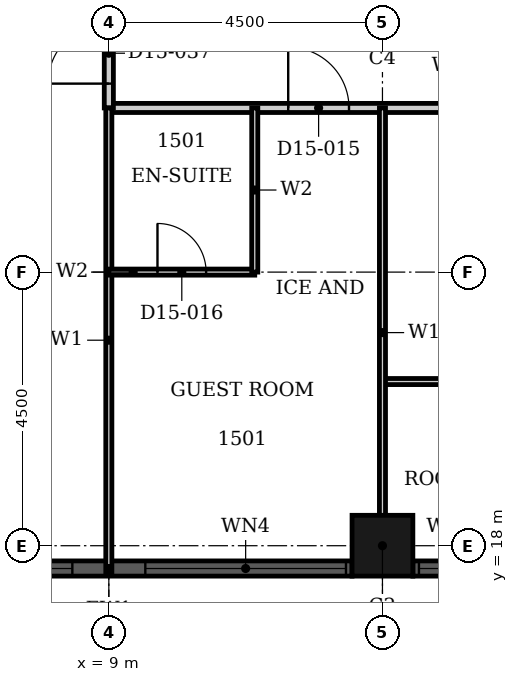
"""IFC4 building model, lengths in metres.
Left out: names, types, materials, properties, quantities, classifications, styles, units other than length and angle.
Written with IfcOpenShell. Run it as: python <this file> out.ifc"""

import sys

from ifc_helpers import new_model, si_unit, direction, frame, frame_2d, origin, origin_2d, place, context, subcontext, project, spatial, rectangle, hollow_rectangle, extrude, element, fill, save


model = new_model("IFC4")
c1 = context("Model", 3, precision=1e-05, world=origin(), true_north=direction((0.0, 1.0)))
c2 = subcontext(c1, "Body", "Model", "MODEL_VIEW")
j1 = project(units=[si_unit("LENGTHUNIT", "METRE"), si_unit("PLANEANGLEUNIT", "RADIAN")], contexts=[c1])
p1 = place(None, origin())
s1 = spatial("IfcSite", under=j1, at=p1, CompositionType="ELEMENT")
p2 = place(p1, origin())
s2 = spatial("IfcBuilding", under=s1, at=p2, CompositionType="ELEMENT")
p3 = place(p2, frame((0.0, 0.0, 67.2)))
s3 = spatial("IfcBuildingStorey", under=s2, at=p3, CompositionType="ELEMENT", Elevation=67.2)
p4 = place(p3, frame((13.5, 18.0, 0.0), z_axis=(0.0, 0.0, 1.0), x_axis=(1.0, 0.0, 0.0)))
e1 = element("IfcColumn", 1, at=p4, inside=s3, PredefinedType="COLUMN", context=c2, shape_type="SweptSolid", body=[
    extrude(hollow_rectangle(XDim=1.0, YDim=1.0, WallThickness=0.032, at=origin_2d()), origin(), (0.0, 0.0, 1.0), 3.6),
])
p5 = place(p3, frame((5.0, 17.625, 0.0), z_axis=(0.0, 0.0, 1.0), x_axis=(1.0, 0.0, 0.0)))
e2 = element("IfcWall", 2, at=p5, inside=s3, PredefinedType="SOLIDWALL", context=c2, shape_type="SweptSolid", body=[
    extrude(rectangle(XDim=8.0, YDim=0.25, at=frame_2d((4.0, 0.0))), origin(), (0.0, 0.0, 1.0), 3.6),
])
p6 = place(p5, frame((0.1, 0.0, 0.9)))
e3 = element("IfcOpeningElement", 3, at=p6, cuts=e2, PredefinedType="OPENING", context=c2, shape_type="SweptSolid", body=[
    extrude(rectangle(XDim=3.3, YDim=2.08, at=frame_2d((1.65, 1.04))), frame((0.0, 0.135, 0.0), z_axis=(0.0, -1.0, 0.0), x_axis=(1.0, 0.0, 0.0)), (0.0, 0.0, 1.0), 0.27),
])
p7 = place(p5, frame((4.6, 0.0, 0.9)))
e4 = element("IfcOpeningElement", 4, at=p7, cuts=e2, PredefinedType="OPENING", context=c2, shape_type="SweptSolid", body=[
    extrude(rectangle(XDim=3.3, YDim=2.08, at=frame_2d((1.65, 1.04))), frame((0.0, 0.135, 0.0), z_axis=(0.0, -1.0, 0.0), x_axis=(1.0, 0.0, 0.0)), (0.0, 0.0, 1.0), 0.27),
])
p8 = place(p3, frame((14.0, 17.625, 0.0), z_axis=(0.0, 0.0, 1.0), x_axis=(1.0, 0.0, 0.0)))
e5 = element("IfcWall", 5, at=p8, inside=s3, PredefinedType="SOLIDWALL", context=c2, shape_type="SweptSolid", body=[
    extrude(rectangle(XDim=1.25, YDim=0.25, at=frame_2d((0.625, 0.0))), origin(), (0.0, 0.0, 1.0), 3.6),
])
p9 = place(p8, frame((0.1, 0.0, 0.9)))
e6 = element("IfcOpeningElement", 6, at=p9, cuts=e5, PredefinedType="OPENING", context=c2, shape_type="SweptSolid", body=[
    extrude(rectangle(XDim=1.05, YDim=2.08, at=frame_2d((0.525, 1.04))), frame((0.0, 0.135, 0.0), z_axis=(0.0, -1.0, 0.0), x_axis=(1.0, 0.0, 0.0)), (0.0, 0.0, 1.0), 0.27),
])
p10 = place(p3, frame((9.0, 25.2, 0.0), z_axis=(0.0, 0.0, 1.0), x_axis=(1.0, 0.0, 0.0)))
e7 = element("IfcWall", 7, at=p10, inside=s3, PredefinedType="PARTITIONING", context=c2, shape_type="SweptSolid", body=[
    extrude(rectangle(XDim=7.2, YDim=0.15, at=frame_2d((3.6, 0.0))), origin(), (0.0, 0.0, 1.0), 3.3),
])
p11 = place(p10, frame((2.95, 0.0, 0.0)))
e8 = element("IfcOpeningElement", 8, at=p11, cuts=e7, PredefinedType="OPENING", context=c2, shape_type="SweptSolid", body=[
    extrude(rectangle(XDim=1.0, YDim=2.1, at=frame_2d((0.5, 1.05))), frame((0.0, 0.085, 0.0), z_axis=(0.0, -1.0, 0.0), x_axis=(1.0, 0.0, 0.0)), (0.0, 0.0, 1.0), 0.17),
])
p12 = place(p3, frame((9.0, 25.2, 0.0), z_axis=(0.0, 0.0, 1.0), x_axis=(0.0, 1.0, 0.0)))
e9 = element("IfcWall", 9, at=p12, inside=s3, PredefinedType="PARTITIONING", context=c2, shape_type="SweptSolid", body=[
    extrude(rectangle(XDim=1.8, YDim=0.15, at=frame_2d((0.9, 0.0))), origin(), (0.0, 0.0, 1.0), 3.3),
])
p13 = place(p12, frame((0.4, 0.0, 0.0)))
e10 = element("IfcOpeningElement", 10, at=p13, cuts=e9, PredefinedType="OPENING", context=c2, shape_type="SweptSolid", body=[
    extrude(rectangle(XDim=1.0, YDim=2.1, at=frame_2d((0.5, 1.05))), frame((0.0, 0.085, 0.0), z_axis=(0.0, -1.0, 0.0), x_axis=(1.0, 0.0, 0.0)), (0.0, 0.0, 1.0), 0.17),
])
p14 = place(p3, frame((13.5, 20.7, 0.0), z_axis=(0.0, 0.0, 1.0), x_axis=(1.0, 0.0, 0.0)))
e11 = element("IfcWall", 11, at=p14, inside=s3, PredefinedType="PARTITIONING", context=c2, shape_type="SweptSolid", body=[
    extrude(rectangle(XDim=2.7, YDim=0.1, at=frame_2d((1.35, 0.0))), origin(), (0.0, 0.0, 1.0), 3.3),
])
p15 = place(p3, frame((13.5, 17.81, 0.0), z_axis=(0.0, 0.0, 1.0), x_axis=(0.0, 1.0, 0.0)))
e12 = element("IfcWall", 12, at=p15, inside=s3, PredefinedType="PARTITIONING", context=c2, shape_type="SweptSolid", body=[
    extrude(rectangle(XDim=7.39, YDim=0.1, at=frame_2d((3.695, 0.0))), origin(), (0.0, 0.0, 1.0), 2.38),
])
p16 = place(p3, frame((9.0, 17.56, 0.0), z_axis=(0.0, 0.0, 1.0), x_axis=(0.0, 1.0, 0.0)))
e13 = element("IfcWall", 13, at=p16, inside=s3, PredefinedType="PARTITIONING", context=c2, shape_type="SweptSolid", body=[
    extrude(rectangle(XDim=7.64, YDim=0.1, at=frame_2d((3.82, 0.0))), origin(), (0.0, 0.0, 1.0), 3.3),
])
p17 = place(p3, frame((9.0, 22.5, 0.0), z_axis=(0.0, 0.0, 1.0), x_axis=(1.0, 0.0, 0.0)))
e14 = element("IfcWall", 14, at=p17, inside=s3, PredefinedType="PARTITIONING", context=c2, shape_type="SweptSolid", body=[
    extrude(rectangle(XDim=2.4, YDim=0.1, at=frame_2d((1.2, 0.0))), origin(), (0.0, 0.0, 1.0), 2.58),
])
p18 = place(p17, frame((0.8, 0.0, 0.0)))
e15 = element("IfcOpeningElement", 15, at=p18, cuts=e14, PredefinedType="OPENING", context=c2, shape_type="SweptSolid", body=[
    extrude(rectangle(XDim=0.8, YDim=2.1, at=frame_2d((0.4, 1.05))), frame((0.0, 0.06, 0.0), z_axis=(0.0, -1.0, 0.0), x_axis=(1.0, 0.0, 0.0)), (0.0, 0.0, 1.0), 0.12),
])
p19 = place(p3, frame((11.4, 22.5, 0.0), z_axis=(0.0, 0.0, 1.0), x_axis=(0.0, 1.0, 0.0)))
e16 = element("IfcWall", 16, at=p19, inside=s3, PredefinedType="PARTITIONING", context=c2, shape_type="SweptSolid", body=[
    extrude(rectangle(XDim=2.7, YDim=0.1, at=frame_2d((1.35, 0.0))), origin(), (0.0, 0.0, 1.0), 3.3),
])
p20 = place(p6, origin())
e17 = element("IfcWindow", 17, at=p20, inside=s3, PartitioningType="SINGLE_PANEL", PredefinedType="WINDOW", context=c2, shape_type="SweptSolid", body=[
    extrude(rectangle(XDim=3.3, YDim=2.08, at=frame_2d((1.65, 1.04))), frame((0.0, 0.03, 0.0), z_axis=(0.0, -1.0, 0.0), x_axis=(1.0, 0.0, 0.0)), (0.0, 0.0, 1.0), 0.06),
])
fill(e3, e17)
p21 = place(p7, origin())
e18 = element("IfcWindow", 18, at=p21, inside=s3, PartitioningType="SINGLE_PANEL", PredefinedType="WINDOW", context=c2, shape_type="SweptSolid", body=[
    extrude(rectangle(XDim=3.3, YDim=2.08, at=frame_2d((1.65, 1.04))), frame((0.0, 0.03, 0.0), z_axis=(0.0, -1.0, 0.0), x_axis=(1.0, 0.0, 0.0)), (0.0, 0.0, 1.0), 0.06),
])
fill(e4, e18)
p22 = place(p9, origin())
e19 = element("IfcWindow", 19, at=p22, inside=s3, PartitioningType="SINGLE_PANEL", PredefinedType="WINDOW", context=c2, shape_type="SweptSolid", body=[
    extrude(rectangle(XDim=1.05, YDim=2.08, at=frame_2d((0.525, 1.04))), frame((0.0, 0.03, 0.0), z_axis=(0.0, -1.0, 0.0), x_axis=(1.0, 0.0, 0.0)), (0.0, 0.0, 1.0), 0.06),
])
fill(e6, e19)
p23 = place(p11, origin())
e20 = element("IfcDoor", 20, at=p23, inside=s3, OperationType="SINGLE_SWING_RIGHT", PredefinedType="DOOR", context=c2, shape_type="SweptSolid", body=[
    extrude(rectangle(XDim=1.0, YDim=2.1, at=frame_2d((0.5, 1.05))), frame((0.0, 0.025, 0.0), z_axis=(0.0, -1.0, 0.0), x_axis=(1.0, 0.0, 0.0)), (0.0, 0.0, 1.0), 0.05),
])
fill(e8, e20)
p24 = place(p18, origin())
e21 = element("IfcDoor", 21, at=p24, inside=s3, OperationType="SINGLE_SWING_LEFT", PredefinedType="DOOR", context=c2, shape_type="SweptSolid", body=[
    extrude(rectangle(XDim=0.8, YDim=2.1, at=frame_2d((0.4, 1.05))), frame((0.0, 0.025, 0.0), z_axis=(0.0, -1.0, 0.0), x_axis=(1.0, 0.0, 0.0)), (0.0, 0.0, 1.0), 0.05),
])
fill(e15, e21)
p25 = place(p13, origin())
e22 = element("IfcDoor", 22, at=p25, inside=s3, OperationType="SINGLE_SWING_LEFT", PredefinedType="DOOR", context=c2, shape_type="SweptSolid", body=[
    extrude(rectangle(XDim=1.0, YDim=2.1, at=frame_2d((0.5, 1.05))), frame((0.0, 0.025, 0.0), z_axis=(0.0, -1.0, 0.0), x_axis=(1.0, 0.0, 0.0)), (0.0, 0.0, 1.0), 0.05),
])
fill(e10, e22)
save(model, sys.argv[1])
